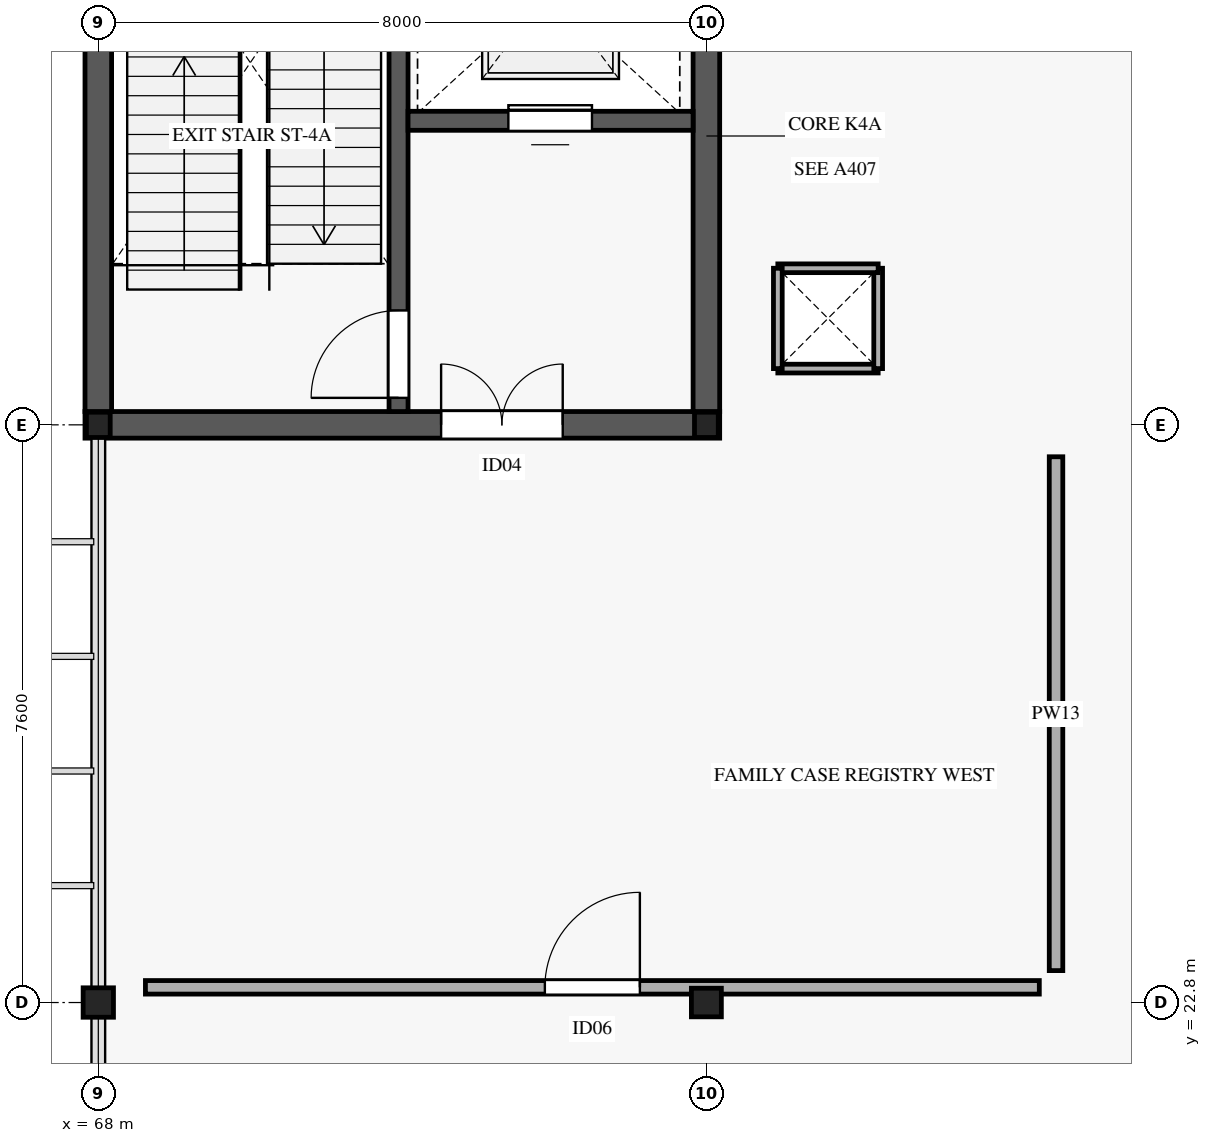
"""IFC4 building model, lengths in metres.
Left out: names, types, materials, properties, quantities, classifications, styles, units other than length and angle.
Written with IfcOpenShell. Run it as: python <this file> out.ifc"""

import sys

from ifc_helpers import new_model, si_unit, direction, frame, frame_2d, origin, origin_2d, place, context, subcontext, project, spatial, rectangle, i_section, extrude, element, fill, save


model = new_model("IFC4")
c1 = context("Model", 3, precision=1e-05, world=origin(), true_north=direction((0.0, 1.0)))
c2 = subcontext(c1, "Body", "Model", "MODEL_VIEW")
j1 = project(units=[si_unit("LENGTHUNIT", "METRE"), si_unit("PLANEANGLEUNIT", "RADIAN")], contexts=[c1])
p1 = place(None, origin())
s1 = spatial("IfcSite", under=j1, at=p1, CompositionType="ELEMENT")
p2 = place(p1, origin())
s2 = spatial("IfcBuilding", under=s1, at=p2, CompositionType="ELEMENT")
p3 = place(p2, frame((0.0, 0.0, 10.8)))
s3 = spatial("IfcBuildingStorey", under=s2, at=p3, CompositionType="ELEMENT", Elevation=10.8)
p4 = place(p3, frame((68.0, 22.8, 0.0), z_axis=(0.0, 0.0, 1.0), x_axis=(1.0, 0.0, 0.0)))
e1 = element("IfcColumn", 1, at=p4, inside=s3, PredefinedType="COLUMN", context=c2, shape_type="SweptSolid", body=[
    extrude(i_section(OverallWidth=0.399, OverallDepth=0.387, WebThickness=0.021, FlangeThickness=0.033, FilletRadius=0.015, at=origin_2d()), origin(), (0.0, 0.0, 1.0), 4.59),
])
p5 = place(p3, frame((68.0, 30.4, 0.0), z_axis=(0.0, 0.0, 1.0), x_axis=(1.0, 0.0, 0.0)))
e2 = element("IfcColumn", 2, at=p5, inside=s3, PredefinedType="COLUMN", context=c2, shape_type="SweptSolid", body=[
    extrude(i_section(OverallWidth=0.313, OverallDepth=0.333, WebThickness=0.018, FlangeThickness=0.028, FilletRadius=0.015, at=origin_2d()), origin(), (0.0, 0.0, 1.0), 4.59),
])
p6 = place(p3, frame((76.0, 22.8, 0.0), z_axis=(0.0, 0.0, 1.0), x_axis=(1.0, 0.0, 0.0)))
e3 = element("IfcColumn", 3, at=p6, inside=s3, PredefinedType="COLUMN", context=c2, shape_type="SweptSolid", body=[
    extrude(i_section(OverallWidth=0.394, OverallDepth=0.376, WebThickness=0.017, FlangeThickness=0.028, FilletRadius=0.015, at=origin_2d()), origin(), (0.0, 0.0, 1.0), 4.59),
])
p7 = place(p3, frame((76.0, 30.4, 0.0), z_axis=(0.0, 0.0, 1.0), x_axis=(1.0, 0.0, 0.0)))
e4 = element("IfcColumn", 4, at=p7, inside=s3, PredefinedType="COLUMN", context=c2, shape_type="SweptSolid", body=[
    extrude(i_section(OverallWidth=0.313, OverallDepth=0.333, WebThickness=0.018, FlangeThickness=0.028, FilletRadius=0.015, at=origin_2d()), origin(), (0.0, 0.0, 1.0), 4.59),
])
for number, where, z_axis, x_axis in (
    (5, (76.94, 31.14, 0.0), (0.0, 0.0, 1.0), (1.0, 0.0, 0.0)),
    (6, (78.26, 31.14, 0.0), (0.0, 0.0, 1.0), (0.0, 1.0, 0.0)),
    (7, (78.26, 32.46, 0.0), (0.0, 0.0, 1.0), (-1.0, 0.0, 0.0)),
    (8, (76.94, 32.46, 0.0), (0.0, 0.0, 1.0), (0.0, -1.0, 0.0)),
):
    element("IfcWall", number, at=place(p3, frame(where, z_axis=z_axis, x_axis=x_axis)), inside=s3, PredefinedType="PARTITIONING", context=c2, shape_type="SweptSolid", body=[
        extrude(rectangle(XDim=1.32, YDim=0.115, at=frame_2d((0.66, 0.0))), origin(), (0.0, 0.0, 1.0), 3.75),
    ])
p8 = place(p3, frame((67.825, 30.4, 0.0), z_axis=(0.0, 0.0, 1.0), x_axis=(1.0, 0.0, 0.0)))
e9 = element("IfcWall", 9, at=p8, inside=s3, PredefinedType="SHEAR", context=c2, shape_type="SweptSolid", body=[
    extrude(rectangle(XDim=8.35, YDim=0.35, at=frame_2d((4.175, 0.0))), origin(), (0.0, 0.0, 1.0), 4.59),
])
p9 = place(p8, frame((4.685, 0.0, 0.0)))
e10 = element("IfcOpeningElement", 10, at=p9, cuts=e9, PredefinedType="OPENING", context=c2, shape_type="SweptSolid", body=[
    extrude(rectangle(XDim=1.6, YDim=2.35, at=frame_2d((0.8, 1.175))), frame((0.0, 0.185, 0.0), z_axis=(0.0, -1.0, 0.0), x_axis=(1.0, 0.0, 0.0)), (0.0, 0.0, 1.0), 0.37),
])
for number, where, z_axis, x_axis in (
    (11, (68.0, 30.575, 0.0), (0.0, 0.0, 1.0), (0.0, 1.0, 0.0)),
    (12, (76.0, 30.575, 0.0), (0.0, 0.0, 1.0), (0.0, 1.0, 0.0)),
):
    element("IfcWall", number, at=place(p3, frame(where, z_axis=z_axis, x_axis=x_axis)), inside=s3, PredefinedType="SHEAR", context=c2, shape_type="SweptSolid", body=[
        extrude(rectangle(XDim=7.25, YDim=0.35, at=frame_2d((3.625, 0.0))), origin(), (0.0, 0.0, 1.0), 4.59),
    ])
p10 = place(p3, frame((71.95, 30.575, 0.0), z_axis=(0.0, 0.0, 1.0), x_axis=(0.0, 1.0, 0.0)))
e13 = element("IfcWall", 13, at=p10, inside=s3, PredefinedType="SHEAR", context=c2, shape_type="SweptSolid", body=[
    extrude(rectangle(XDim=7.25, YDim=0.25, at=frame_2d((3.625, 0.0))), origin(), (0.0, 0.0, 1.0), 4.59),
])
p11 = place(p10, frame((0.18, 0.0, 0.0)))
e14 = element("IfcOpeningElement", 14, at=p11, cuts=e13, PredefinedType="OPENING", context=c2, shape_type="SweptSolid", body=[
    extrude(rectangle(XDim=1.15, YDim=2.2, at=frame_2d((0.575, 1.1))), frame((0.0, 0.135, 0.0), z_axis=(0.0, -1.0, 0.0), x_axis=(1.0, 0.0, 0.0)), (0.0, 0.0, 1.0), 0.27),
])
p12 = place(p3, frame((72.075, 34.4, 0.0), z_axis=(0.0, 0.0, 1.0), x_axis=(1.0, 0.0, 0.0)))
e15 = element("IfcWall", 15, at=p12, inside=s3, PredefinedType="SHEAR", context=c2, shape_type="SweptSolid", body=[
    extrude(rectangle(XDim=3.75, YDim=0.25, at=frame_2d((1.875, 0.0))), origin(), (0.0, 0.0, 1.0), 4.59),
])
p13 = place(p12, frame((1.32, 0.0, 0.0)))
e16 = element("IfcOpeningElement", 16, at=p13, cuts=e15, PredefinedType="OPENING", context=c2, shape_type="SweptSolid", body=[
    extrude(rectangle(XDim=1.1, YDim=2.2, at=frame_2d((0.55, 1.1))), frame((0.0, 0.135, 0.0), z_axis=(0.0, -1.0, 0.0), x_axis=(1.0, 0.0, 0.0)), (0.0, 0.0, 1.0), 0.27),
])
p14 = place(p3, frame((68.62, 23.0, 0.0), z_axis=(0.0, 0.0, 1.0), x_axis=(1.0, 0.0, 0.0)))
e17 = element("IfcWall", 17, at=p14, inside=s3, PredefinedType="PARTITIONING", context=c2, shape_type="SweptSolid", body=[
    extrude(rectangle(XDim=11.76, YDim=0.178, at=frame_2d((5.88, 0.0))), origin(), (0.0, 0.0, 1.0), 3.45),
])
p15 = place(p14, frame((5.255, 0.0, 0.0)))
e18 = element("IfcOpeningElement", 18, at=p15, cuts=e17, PredefinedType="OPENING", context=c2, shape_type="SweptSolid", body=[
    extrude(rectangle(XDim=1.25, YDim=2.2, at=frame_2d((0.625, 1.1))), frame((0.0, 0.099, 0.0), z_axis=(0.0, -1.0, 0.0), x_axis=(1.0, 0.0, 0.0)), (0.0, 0.0, 1.0), 0.198),
])
p16 = place(p3, frame((80.6, 23.22, 0.0), z_axis=(0.0, 0.0, 1.0), x_axis=(0.0, 1.0, 0.0)))
e19 = element("IfcWall", 19, at=p16, inside=s3, PredefinedType="PARTITIONING", context=c2, shape_type="SweptSolid", body=[
    extrude(rectangle(XDim=6.76, YDim=0.178, at=frame_2d((3.38, 0.0))), origin(), (0.0, 0.0, 1.0), 3.45),
])
p17 = place(p11, origin())
e20 = element("IfcDoor", 20, at=p17, inside=s3, OperationType="SINGLE_SWING_LEFT", PredefinedType="DOOR", context=c2, shape_type="SweptSolid", body=[
    extrude(rectangle(XDim=1.15, YDim=2.2, at=frame_2d((0.575, 1.1))), frame((0.0, 0.025, 0.0), z_axis=(0.0, -1.0, 0.0), x_axis=(1.0, 0.0, 0.0)), (0.0, 0.0, 1.0), 0.05),
])
fill(e14, e20)
p18 = place(p9, origin())
e21 = element("IfcDoor", 21, at=p18, inside=s3, OperationType="DOUBLE_DOOR_SINGLE_SWING", PredefinedType="DOOR", context=c2, shape_type="SweptSolid", body=[
    extrude(rectangle(XDim=1.6, YDim=2.35, at=frame_2d((0.8, 1.175))), frame((0.0, 0.025, 0.0), z_axis=(0.0, -1.0, 0.0), x_axis=(1.0, 0.0, 0.0)), (0.0, 0.0, 1.0), 0.05),
])
fill(e10, e21)
p19 = place(p13, origin())
e22 = element("IfcDoor", 22, at=p19, inside=s3, OperationType="SLIDING_TO_LEFT", PredefinedType="DOOR", context=c2, shape_type="SweptSolid", body=[
    extrude(rectangle(XDim=1.1, YDim=2.2, at=frame_2d((0.55, 1.1))), frame((0.0, 0.025, 0.0), z_axis=(0.0, -1.0, 0.0), x_axis=(1.0, 0.0, 0.0)), (0.0, 0.0, 1.0), 0.05),
])
fill(e16, e22)
p20 = place(p15, origin())
e23 = element("IfcDoor", 23, at=p20, inside=s3, OperationType="SINGLE_SWING_RIGHT", PredefinedType="DOOR", context=c2, shape_type="SweptSolid", body=[
    extrude(rectangle(XDim=1.25, YDim=2.2, at=frame_2d((0.625, 1.1))), frame((0.0, 0.025, 0.0), z_axis=(0.0, -1.0, 0.0), x_axis=(1.0, 0.0, 0.0)), (0.0, 0.0, 1.0), 0.05),
])
fill(e18, e23)
save(model, sys.argv[1])
